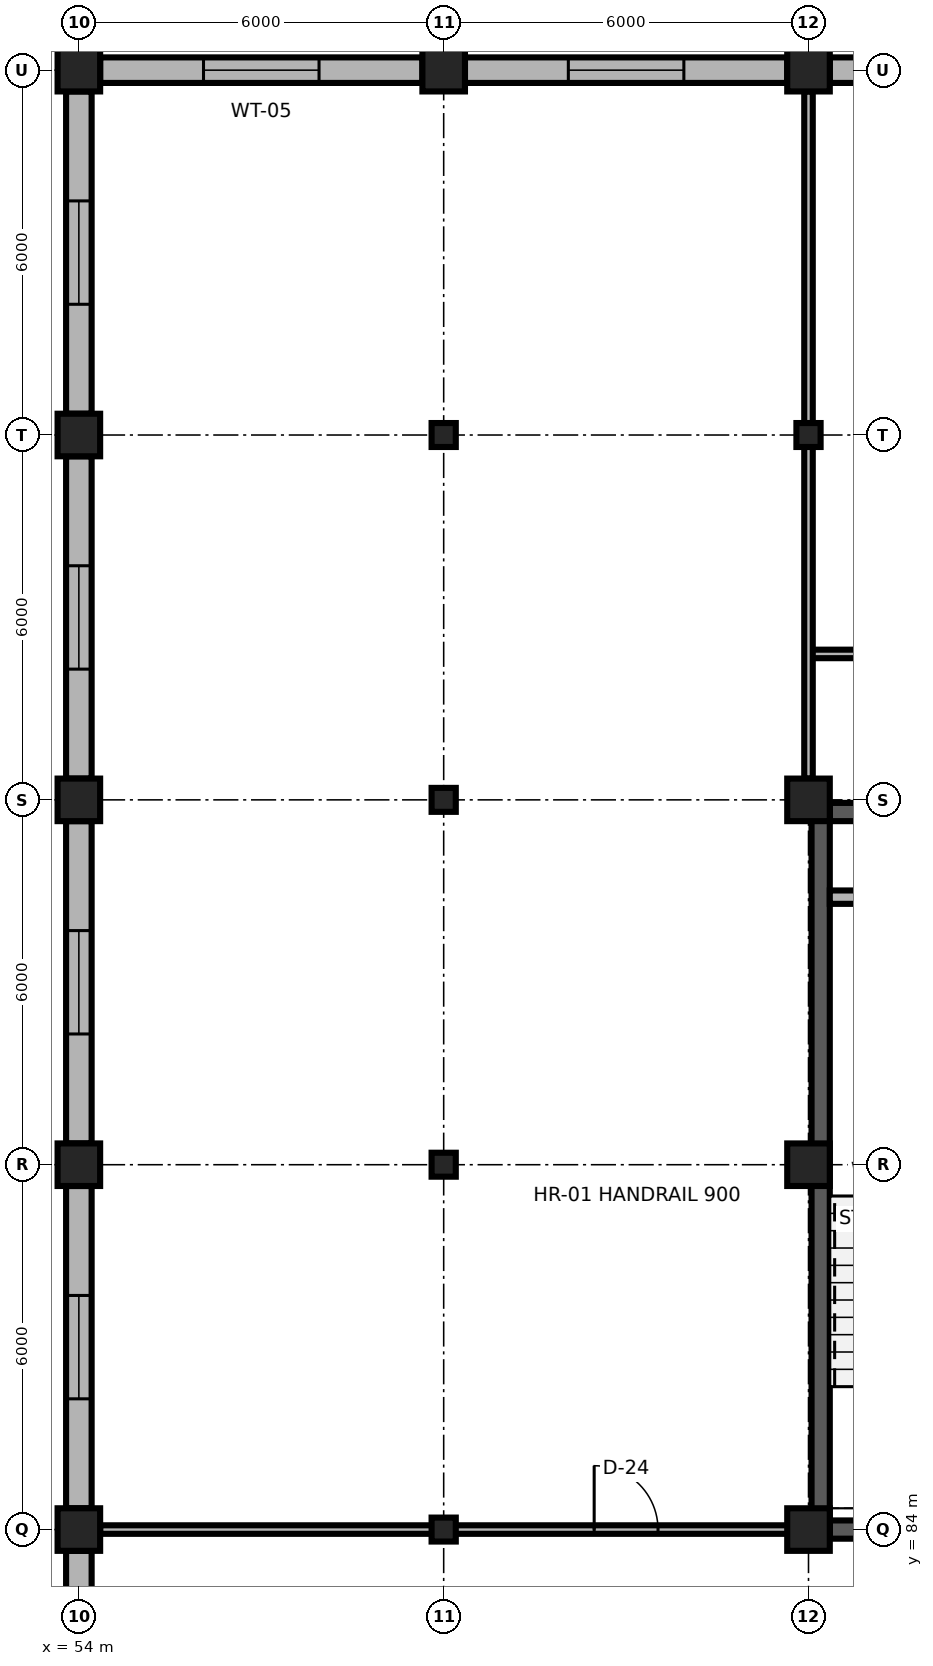
"""IFC4 building model, lengths in metres.
Left out: names, types, materials, properties, quantities, classifications, styles, units other than length and angle.
Written with IfcOpenShell. Run it as: python <this file> out.ifc"""

import sys

from ifc_helpers import new_model, si_unit, direction, frame, frame_2d, origin, origin_2d, place, context, subcontext, project, spatial, rectangle, i_section, extrude, element, fill, save


model = new_model("IFC4")
c1 = context("Model", 3, precision=1e-05, world=origin(), true_north=direction((0.0, 1.0)))
c2 = subcontext(c1, "Body", "Model", "MODEL_VIEW")
j1 = project(units=[si_unit("LENGTHUNIT", "METRE"), si_unit("PLANEANGLEUNIT", "RADIAN")], contexts=[c1])
p1 = place(None, origin())
s1 = spatial("IfcSite", under=j1, at=p1, CompositionType="ELEMENT")
p2 = place(p1, origin())
s2 = spatial("IfcBuilding", under=s1, at=p2, CompositionType="ELEMENT")
p3 = place(p2, frame((0.0, 0.0, 28.8)))
s3 = spatial("IfcBuildingStorey", under=s2, at=p3, CompositionType="ELEMENT", Elevation=28.8)
p4 = place(p3, frame((54.0, 84.0, 0.0), z_axis=(0.0, 0.0, 1.0), x_axis=(1.0, 0.0, 0.0)))
e1 = element("IfcColumn", 1, at=p4, inside=s3, PredefinedType="COLUMN", context=c2, shape_type="SweptSolid", body=[
    extrude(rectangle(XDim=0.7, YDim=0.7, at=origin_2d()), origin(), (0.0, 0.0, 1.0), 3.9),
])
p5 = place(p3, frame((60.0, 84.0, 0.0), z_axis=(0.0, 0.0, 1.0), x_axis=(1.0, 0.0, 0.0)))
e2 = element("IfcColumn", 2, at=p5, inside=s3, PredefinedType="COLUMN", context=c2, shape_type="SweptSolid", body=[
    extrude(i_section(OverallWidth=0.398, OverallDepth=0.394, WebThickness=0.011, FlangeThickness=0.018, FilletRadius=0.022, at=origin_2d()), origin(), (0.0, 0.0, 1.0), 3.9),
])
for number, where, z_axis, x_axis in (
    (3, (66.0, 84.0, 0.0), (0.0, 0.0, 1.0), (1.0, 0.0, 0.0)),
    (4, (54.0, 90.0, 0.0), (0.0, 0.0, 1.0), (1.0, 0.0, 0.0)),
):
    element("IfcColumn", number, at=place(p3, frame(where, z_axis=z_axis, x_axis=x_axis)), inside=s3, PredefinedType="COLUMN", context=c2, shape_type="SweptSolid", body=[
        extrude(rectangle(XDim=0.7, YDim=0.7, at=origin_2d()), origin(), (0.0, 0.0, 1.0), 3.9),
    ])
p6 = place(p3, frame((60.0, 90.0, 0.0), z_axis=(0.0, 0.0, 1.0), x_axis=(1.0, 0.0, 0.0)))
e5 = element("IfcColumn", 5, at=p6, inside=s3, PredefinedType="COLUMN", context=c2, shape_type="SweptSolid", body=[
    extrude(i_section(OverallWidth=0.398, OverallDepth=0.394, WebThickness=0.011, FlangeThickness=0.018, FilletRadius=0.022, at=origin_2d()), origin(), (0.0, 0.0, 1.0), 3.9),
])
for number, where, z_axis, x_axis in (
    (6, (66.0, 90.0, 0.0), (0.0, 0.0, 1.0), (1.0, 0.0, 0.0)),
    (7, (54.0, 96.0, 0.0), (0.0, 0.0, 1.0), (1.0, 0.0, 0.0)),
):
    element("IfcColumn", number, at=place(p3, frame(where, z_axis=z_axis, x_axis=x_axis)), inside=s3, PredefinedType="COLUMN", context=c2, shape_type="SweptSolid", body=[
        extrude(rectangle(XDim=0.7, YDim=0.7, at=origin_2d()), origin(), (0.0, 0.0, 1.0), 3.9),
    ])
p7 = place(p3, frame((60.0, 96.0, 0.0), z_axis=(0.0, 0.0, 1.0), x_axis=(1.0, 0.0, 0.0)))
e8 = element("IfcColumn", 8, at=p7, inside=s3, PredefinedType="COLUMN", context=c2, shape_type="SweptSolid", body=[
    extrude(i_section(OverallWidth=0.398, OverallDepth=0.394, WebThickness=0.011, FlangeThickness=0.018, FilletRadius=0.022, at=origin_2d()), origin(), (0.0, 0.0, 1.0), 3.9),
])
for number, where, z_axis, x_axis in (
    (9, (66.0, 96.0, 0.0), (0.0, 0.0, 1.0), (1.0, 0.0, 0.0)),
    (10, (54.0, 102.0, 0.0), (0.0, 0.0, 1.0), (1.0, 0.0, 0.0)),
):
    element("IfcColumn", number, at=place(p3, frame(where, z_axis=z_axis, x_axis=x_axis)), inside=s3, PredefinedType="COLUMN", context=c2, shape_type="SweptSolid", body=[
        extrude(rectangle(XDim=0.7, YDim=0.7, at=origin_2d()), origin(), (0.0, 0.0, 1.0), 3.9),
    ])
for number, where, z_axis, x_axis in (
    (11, (60.0, 102.0, 0.0), (0.0, 0.0, 1.0), (1.0, 0.0, 0.0)),
    (12, (66.0, 102.0, 0.0), (0.0, 0.0, 1.0), (1.0, 0.0, 0.0)),
):
    element("IfcColumn", number, at=place(p3, frame(where, z_axis=z_axis, x_axis=x_axis)), inside=s3, PredefinedType="COLUMN", context=c2, shape_type="SweptSolid", body=[
        extrude(i_section(OverallWidth=0.398, OverallDepth=0.394, WebThickness=0.011, FlangeThickness=0.018, FilletRadius=0.022, at=origin_2d()), origin(), (0.0, 0.0, 1.0), 3.9),
    ])
for number, where, z_axis, x_axis in (
    (13, (54.0, 108.0, 0.0), (0.0, 0.0, 1.0), (1.0, 0.0, 0.0)),
    (14, (60.0, 108.0, 0.0), (0.0, 0.0, 1.0), (1.0, 0.0, 0.0)),
    (15, (66.0, 108.0, 0.0), (0.0, 0.0, 1.0), (1.0, 0.0, 0.0)),
):
    element("IfcColumn", number, at=place(p3, frame(where, z_axis=z_axis, x_axis=x_axis)), inside=s3, PredefinedType="COLUMN", context=c2, shape_type="SweptSolid", body=[
        extrude(rectangle(XDim=0.7, YDim=0.7, at=origin_2d()), origin(), (0.0, 0.0, 1.0), 3.9),
    ])
p8 = place(p3, frame((54.35, 108.0, 0.0), z_axis=(0.0, 0.0, 1.0), x_axis=(1.0, 0.0, 0.0)))
e16 = element("IfcWall", 16, at=p8, inside=s3, PredefinedType="SOLIDWALL", context=c2, shape_type="SweptSolid", body=[
    extrude(rectangle(XDim=5.3, YDim=0.42, at=frame_2d((2.65, 0.0))), origin(), (0.0, 0.0, 1.0), 3.32),
])
p9 = place(p8, frame((1.7, 0.0, 0.85)))
e17 = element("IfcOpeningElement", 17, at=p9, cuts=e16, PredefinedType="OPENING", context=c2, shape_type="SweptSolid", body=[
    extrude(rectangle(XDim=1.9, YDim=2.1, at=frame_2d((0.95, 1.05))), frame((0.0, 0.225, 0.0), z_axis=(0.0, -1.0, 0.0), x_axis=(1.0, 0.0, 0.0)), (0.0, 0.0, 1.0), 0.45),
])
p10 = place(p3, frame((60.35, 108.0, 0.0), z_axis=(0.0, 0.0, 1.0), x_axis=(1.0, 0.0, 0.0)))
e18 = element("IfcWall", 18, at=p10, inside=s3, PredefinedType="SOLIDWALL", context=c2, shape_type="SweptSolid", body=[
    extrude(rectangle(XDim=5.3, YDim=0.42, at=frame_2d((2.65, 0.0))), origin(), (0.0, 0.0, 1.0), 3.32),
])
p11 = place(p10, frame((1.7, 0.0, 0.85)))
e19 = element("IfcOpeningElement", 19, at=p11, cuts=e18, PredefinedType="OPENING", context=c2, shape_type="SweptSolid", body=[
    extrude(rectangle(XDim=1.9, YDim=2.1, at=frame_2d((0.95, 1.05))), frame((0.0, 0.225, 0.0), z_axis=(0.0, -1.0, 0.0), x_axis=(1.0, 0.0, 0.0)), (0.0, 0.0, 1.0), 0.45),
])
p12 = place(p3, frame((66.35, 108.0, 0.0), z_axis=(0.0, 0.0, 1.0), x_axis=(1.0, 0.0, 0.0)))
e20 = element("IfcWall", 20, at=p12, inside=s3, PredefinedType="SOLIDWALL", context=c2, shape_type="SweptSolid", body=[
    extrude(rectangle(XDim=5.3, YDim=0.42, at=frame_2d((2.65, 0.0))), origin(), (0.0, 0.0, 1.0), 3.32),
])
p13 = place(p12, frame((1.7, 0.0, 0.85)))
e21 = element("IfcOpeningElement", 21, at=p13, cuts=e20, PredefinedType="OPENING", context=c2, shape_type="SweptSolid", body=[
    extrude(rectangle(XDim=1.9, YDim=2.1, at=frame_2d((0.95, 1.05))), frame((0.0, 0.225, 0.0), z_axis=(0.0, -1.0, 0.0), x_axis=(1.0, 0.0, 0.0)), (0.0, 0.0, 1.0), 0.45),
])
p14 = place(p3, frame((54.0, 78.35, 0.0), z_axis=(0.0, 0.0, 1.0), x_axis=(0.0, 1.0, 0.0)))
e22 = element("IfcWall", 22, at=p14, inside=s3, PredefinedType="SOLIDWALL", context=c2, shape_type="SweptSolid", body=[
    extrude(rectangle(XDim=5.3, YDim=0.42, at=frame_2d((2.65, 0.0))), origin(), (0.0, 0.0, 1.0), 3.32),
])
p15 = place(p14, frame((1.8, 0.0, 0.85)))
e23 = element("IfcOpeningElement", 23, at=p15, cuts=e22, PredefinedType="OPENING", context=c2, shape_type="SweptSolid", body=[
    extrude(rectangle(XDim=1.7, YDim=2.05, at=frame_2d((0.85, 1.025))), frame((0.0, 0.225, 0.0), z_axis=(0.0, -1.0, 0.0), x_axis=(1.0, 0.0, 0.0)), (0.0, 0.0, 1.0), 0.45),
])
p16 = place(p3, frame((54.0, 84.35, 0.0), z_axis=(0.0, 0.0, 1.0), x_axis=(0.0, 1.0, 0.0)))
e24 = element("IfcWall", 24, at=p16, inside=s3, PredefinedType="SOLIDWALL", context=c2, shape_type="SweptSolid", body=[
    extrude(rectangle(XDim=5.3, YDim=0.42, at=frame_2d((2.65, 0.0))), origin(), (0.0, 0.0, 1.0), 3.32),
])
p17 = place(p16, frame((1.8, 0.0, 0.85)))
e25 = element("IfcOpeningElement", 25, at=p17, cuts=e24, PredefinedType="OPENING", context=c2, shape_type="SweptSolid", body=[
    extrude(rectangle(XDim=1.7, YDim=2.05, at=frame_2d((0.85, 1.025))), frame((0.0, 0.225, 0.0), z_axis=(0.0, -1.0, 0.0), x_axis=(1.0, 0.0, 0.0)), (0.0, 0.0, 1.0), 0.45),
])
p18 = place(p3, frame((54.0, 90.35, 0.0), z_axis=(0.0, 0.0, 1.0), x_axis=(0.0, 1.0, 0.0)))
e26 = element("IfcWall", 26, at=p18, inside=s3, PredefinedType="SOLIDWALL", context=c2, shape_type="SweptSolid", body=[
    extrude(rectangle(XDim=5.3, YDim=0.42, at=frame_2d((2.65, 0.0))), origin(), (0.0, 0.0, 1.0), 3.32),
])
p19 = place(p18, frame((1.8, 0.0, 0.85)))
e27 = element("IfcOpeningElement", 27, at=p19, cuts=e26, PredefinedType="OPENING", context=c2, shape_type="SweptSolid", body=[
    extrude(rectangle(XDim=1.7, YDim=2.05, at=frame_2d((0.85, 1.025))), frame((0.0, 0.225, 0.0), z_axis=(0.0, -1.0, 0.0), x_axis=(1.0, 0.0, 0.0)), (0.0, 0.0, 1.0), 0.45),
])
p20 = place(p3, frame((54.0, 96.35, 0.0), z_axis=(0.0, 0.0, 1.0), x_axis=(0.0, 1.0, 0.0)))
e28 = element("IfcWall", 28, at=p20, inside=s3, PredefinedType="SOLIDWALL", context=c2, shape_type="SweptSolid", body=[
    extrude(rectangle(XDim=5.3, YDim=0.42, at=frame_2d((2.65, 0.0))), origin(), (0.0, 0.0, 1.0), 3.32),
])
p21 = place(p20, frame((1.8, 0.0, 0.85)))
e29 = element("IfcOpeningElement", 29, at=p21, cuts=e28, PredefinedType="OPENING", context=c2, shape_type="SweptSolid", body=[
    extrude(rectangle(XDim=1.7, YDim=2.05, at=frame_2d((0.85, 1.025))), frame((0.0, 0.225, 0.0), z_axis=(0.0, -1.0, 0.0), x_axis=(1.0, 0.0, 0.0)), (0.0, 0.0, 1.0), 0.45),
])
p22 = place(p3, frame((54.0, 102.35, 0.0), z_axis=(0.0, 0.0, 1.0), x_axis=(0.0, 1.0, 0.0)))
e30 = element("IfcWall", 30, at=p22, inside=s3, PredefinedType="SOLIDWALL", context=c2, shape_type="SweptSolid", body=[
    extrude(rectangle(XDim=5.3, YDim=0.42, at=frame_2d((2.65, 0.0))), origin(), (0.0, 0.0, 1.0), 3.32),
])
p23 = place(p22, frame((1.8, 0.0, 0.85)))
e31 = element("IfcOpeningElement", 31, at=p23, cuts=e30, PredefinedType="OPENING", context=c2, shape_type="SweptSolid", body=[
    extrude(rectangle(XDim=1.7, YDim=2.05, at=frame_2d((0.85, 1.025))), frame((0.0, 0.225, 0.0), z_axis=(0.0, -1.0, 0.0), x_axis=(1.0, 0.0, 0.0)), (0.0, 0.0, 1.0), 0.45),
])
p24 = place(p3, frame((66.35, 84.0, 0.0), z_axis=(0.0, 0.0, 1.0), x_axis=(1.0, 0.0, 0.0)))
e32 = element("IfcWall", 32, at=p24, inside=s3, PredefinedType="SHEAR", context=c2, shape_type="SweptSolid", body=[
    extrude(rectangle(XDim=5.3, YDim=0.3, at=frame_2d((2.65, 0.0))), origin(), (0.0, 0.0, 1.0), 3.66),
])
p25 = place(p24, frame((1.975, 0.0, 0.0)))
e33 = element("IfcOpeningElement", 33, at=p25, cuts=e32, PredefinedType="OPENING", context=c2, shape_type="SweptSolid", body=[
    extrude(rectangle(XDim=1.35, YDim=2.2, at=frame_2d((0.675, 1.1))), frame((0.0, 0.165, 0.0), z_axis=(0.0, -1.0, 0.0), x_axis=(1.0, 0.0, 0.0)), (0.0, 0.0, 1.0), 0.33),
])
p26 = place(p3, frame((66.35, 95.8, 0.0), z_axis=(0.0, 0.0, 1.0), x_axis=(1.0, 0.0, 0.0)))
e34 = element("IfcWall", 34, at=p26, inside=s3, PredefinedType="SHEAR", context=c2, shape_type="SweptSolid", body=[
    extrude(rectangle(XDim=5.3, YDim=0.3, at=frame_2d((2.65, 0.0))), origin(), (0.0, 0.0, 1.0), 3.74),
])
p27 = place(p3, frame((66.2, 84.0, 0.0), z_axis=(0.0, 0.0, 1.0), x_axis=(0.0, 1.0, 0.0)))
e35 = element("IfcWall", 35, at=p27, inside=s3, PredefinedType="SHEAR", context=c2, shape_type="SweptSolid", body=[
    extrude(rectangle(XDim=11.8, YDim=0.3, at=frame_2d((5.9, 0.0))), origin(), (0.0, 0.0, 1.0), 3.74),
])
p28 = place(p3, frame((66.35, 94.4, 0.0), z_axis=(0.0, 0.0, 1.0), x_axis=(1.0, 0.0, 0.0)))
e36 = element("IfcWall", 36, at=p28, inside=s3, PredefinedType="PARTITIONING", context=c2, shape_type="SweptSolid", body=[
    extrude(rectangle(XDim=1.1, YDim=0.22, at=frame_2d((0.55, 0.0))), origin(), (0.0, 0.0, 1.0), 3.74),
])
p29 = place(p3, frame((66.0, 98.4, 0.0), z_axis=(0.0, 0.0, 1.0), x_axis=(1.0, 0.0, 0.0)))
e37 = element("IfcWall", 37, at=p29, inside=s3, PredefinedType="PARTITIONING", context=c2, shape_type="SweptSolid", body=[
    extrude(rectangle(XDim=6.0, YDim=0.14, at=frame_2d((3.0, 0.0))), origin(), (0.0, 0.0, 1.0), 3.74),
])
p30 = place(p29, frame((2.54, 0.0, 0.0)))
e38 = element("IfcOpeningElement", 38, at=p30, cuts=e37, PredefinedType="OPENING", context=c2, shape_type="SweptSolid", body=[
    extrude(rectangle(XDim=0.92, YDim=2.15, at=frame_2d((0.46, 1.075))), frame((0.0, 0.085, 0.0), z_axis=(0.0, -1.0, 0.0), x_axis=(1.0, 0.0, 0.0)), (0.0, 0.0, 1.0), 0.17),
])
p31 = place(p3, frame((60.0, 84.0, 0.0), z_axis=(0.0, 0.0, 1.0), x_axis=(1.0, 0.0, 0.0)))
e39 = element("IfcWall", 39, at=p31, inside=s3, PredefinedType="PARTITIONING", context=c2, shape_type="SweptSolid", body=[
    extrude(rectangle(XDim=6.0, YDim=0.14, at=frame_2d((3.0, 0.0))), origin(), (0.0, 0.0, 1.0), 3.352),
])
p32 = place(p31, frame((2.475, 0.0, 0.0)))
e40 = element("IfcOpeningElement", 40, at=p32, cuts=e39, PredefinedType="OPENING", context=c2, shape_type="SweptSolid", body=[
    extrude(rectangle(XDim=1.05, YDim=2.25, at=frame_2d((0.525, 1.125))), frame((0.0, 0.085, 0.0), z_axis=(0.0, -1.0, 0.0), x_axis=(1.0, 0.0, 0.0)), (0.0, 0.0, 1.0), 0.17),
])
p33 = place(p3, frame((66.0, 96.35, 0.0), z_axis=(0.0, 0.0, 1.0), x_axis=(0.0, 1.0, 0.0)))
e41 = element("IfcWall", 41, at=p33, inside=s3, PredefinedType="PARTITIONING", context=c2, shape_type="SweptSolid", body=[
    extrude(rectangle(XDim=11.3, YDim=0.14, at=frame_2d((5.65, 0.0))), origin(), (0.0, 0.0, 1.0), 3.352),
])
p34 = place(p3, frame((54.35, 84.0, 0.0), z_axis=(0.0, 0.0, 1.0), x_axis=(1.0, 0.0, 0.0)))
e42 = element("IfcWall", 42, at=p34, inside=s3, PredefinedType="PARTITIONING", context=c2, shape_type="SweptSolid", body=[
    extrude(rectangle(XDim=5.65, YDim=0.14, at=frame_2d((2.825, 0.0))), origin(), (0.0, 0.0, 1.0), 3.352),
])
p35 = place(p9, origin())
e43 = element("IfcWindow", 43, at=p35, inside=s3, PartitioningType="SINGLE_PANEL", PredefinedType="WINDOW", context=c2, shape_type="SweptSolid", body=[
    extrude(rectangle(XDim=1.9, YDim=2.1, at=frame_2d((0.95, 1.05))), frame((0.0, 0.03, 0.0), z_axis=(0.0, -1.0, 0.0), x_axis=(1.0, 0.0, 0.0)), (0.0, 0.0, 1.0), 0.06),
])
fill(e17, e43)
p36 = place(p11, origin())
e44 = element("IfcWindow", 44, at=p36, inside=s3, PartitioningType="SINGLE_PANEL", PredefinedType="WINDOW", context=c2, shape_type="SweptSolid", body=[
    extrude(rectangle(XDim=1.9, YDim=2.1, at=frame_2d((0.95, 1.05))), frame((0.0, 0.03, 0.0), z_axis=(0.0, -1.0, 0.0), x_axis=(1.0, 0.0, 0.0)), (0.0, 0.0, 1.0), 0.06),
])
fill(e19, e44)
p37 = place(p17, origin())
e45 = element("IfcWindow", 45, at=p37, inside=s3, PartitioningType="SINGLE_PANEL", PredefinedType="WINDOW", context=c2, shape_type="SweptSolid", body=[
    extrude(rectangle(XDim=1.7, YDim=2.05, at=frame_2d((0.85, 1.025))), frame((0.0, 0.03, 0.0), z_axis=(0.0, -1.0, 0.0), x_axis=(1.0, 0.0, 0.0)), (0.0, 0.0, 1.0), 0.06),
])
fill(e25, e45)
p38 = place(p19, origin())
e46 = element("IfcWindow", 46, at=p38, inside=s3, PartitioningType="SINGLE_PANEL", PredefinedType="WINDOW", context=c2, shape_type="SweptSolid", body=[
    extrude(rectangle(XDim=1.7, YDim=2.05, at=frame_2d((0.85, 1.025))), frame((0.0, 0.03, 0.0), z_axis=(0.0, -1.0, 0.0), x_axis=(1.0, 0.0, 0.0)), (0.0, 0.0, 1.0), 0.06),
])
fill(e27, e46)
p39 = place(p21, origin())
e47 = element("IfcWindow", 47, at=p39, inside=s3, PartitioningType="SINGLE_PANEL", PredefinedType="WINDOW", context=c2, shape_type="SweptSolid", body=[
    extrude(rectangle(XDim=1.7, YDim=2.05, at=frame_2d((0.85, 1.025))), frame((0.0, 0.03, 0.0), z_axis=(0.0, -1.0, 0.0), x_axis=(1.0, 0.0, 0.0)), (0.0, 0.0, 1.0), 0.06),
])
fill(e29, e47)
p40 = place(p23, origin())
e48 = element("IfcWindow", 48, at=p40, inside=s3, PartitioningType="SINGLE_PANEL", PredefinedType="WINDOW", context=c2, shape_type="SweptSolid", body=[
    extrude(rectangle(XDim=1.7, YDim=2.05, at=frame_2d((0.85, 1.025))), frame((0.0, 0.03, 0.0), z_axis=(0.0, -1.0, 0.0), x_axis=(1.0, 0.0, 0.0)), (0.0, 0.0, 1.0), 0.06),
])
fill(e31, e48)
p41 = place(p32, origin())
e49 = element("IfcDoor", 49, at=p41, inside=s3, OperationType="SINGLE_SWING_LEFT", PredefinedType="DOOR", context=c2, shape_type="SweptSolid", body=[
    extrude(rectangle(XDim=1.05, YDim=2.25, at=frame_2d((0.525, 1.125))), frame((0.0, 0.025, 0.0), z_axis=(0.0, -1.0, 0.0), x_axis=(1.0, 0.0, 0.0)), (0.0, 0.0, 1.0), 0.05),
])
fill(e40, e49)
save(model, sys.argv[1])
